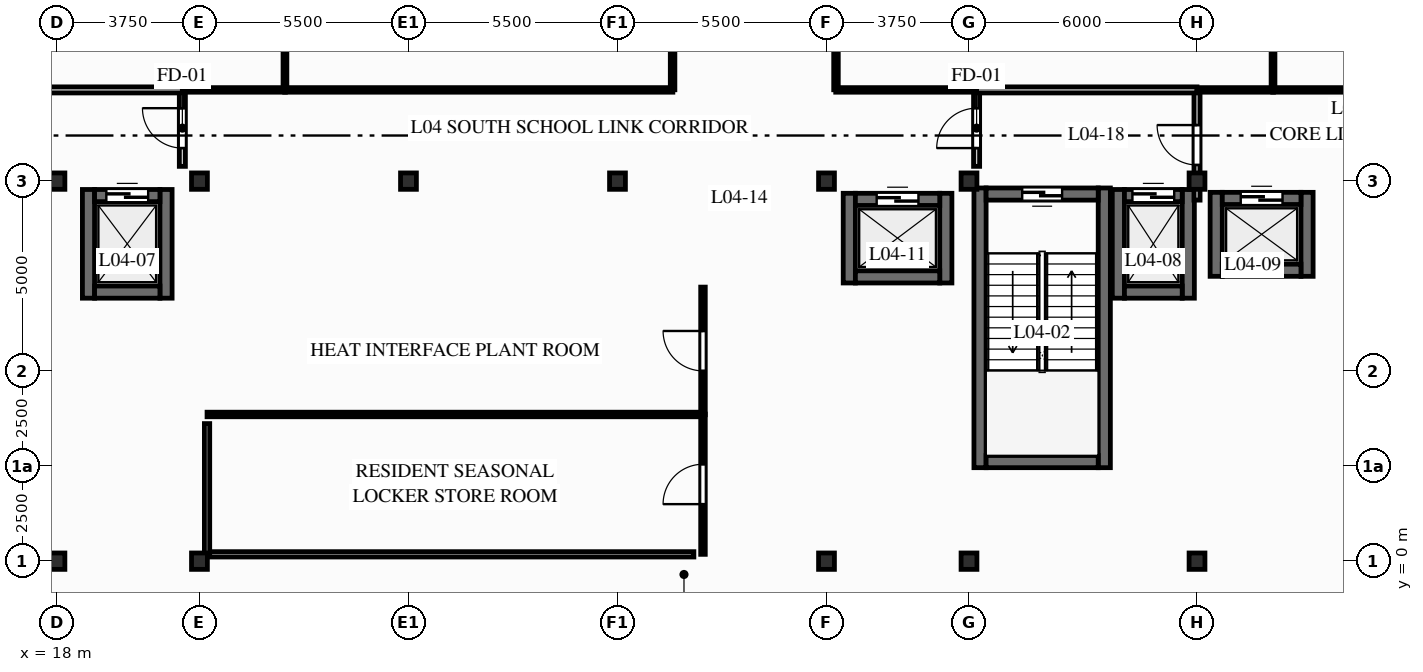
"""IFC4 building model, lengths in metres.
Left out: names, types, materials, properties, quantities, classifications, styles, units other than length and angle.
Written with IfcOpenShell. Run it as: python <this file> out.ifc"""

import sys

from ifc_helpers import new_model, si_unit, direction, frame, frame_2d, origin, origin_2d, place, context, subcontext, project, spatial, rectangle, i_section, extrude, element, fill, save


model = new_model("IFC4")
c1 = context("Model", 3, precision=1e-05, world=origin(), true_north=direction((0.0, 1.0)))
c2 = subcontext(c1, "Body", "Model", "MODEL_VIEW")
j1 = project(units=[si_unit("LENGTHUNIT", "METRE"), si_unit("PLANEANGLEUNIT", "RADIAN")], contexts=[c1])
p1 = place(None, origin())
s1 = spatial("IfcSite", under=j1, at=p1, CompositionType="ELEMENT")
p2 = place(p1, origin())
s2 = spatial("IfcBuilding", under=s1, at=p2, CompositionType="ELEMENT")
p3 = place(p2, frame((0.0, 0.0, 18.0)))
s3 = spatial("IfcBuildingStorey", under=s2, at=p3, CompositionType="ELEMENT", Elevation=18.0)
for number, where, z_axis, x_axis in (
    (1, (18.0, 0.0, 0.0), (0.0, 0.0, 1.0), (1.0, 0.0, 0.0)),
    (2, (18.0, 10.0, 0.0), (0.0, 0.0, 1.0), (1.0, 0.0, 0.0)),
    (3, (21.75, 0.0, 0.0), (0.0, 0.0, 1.0), (1.0, 0.0, 0.0)),
    (4, (21.75, 10.0, 0.0), (0.0, 0.0, 1.0), (1.0, 0.0, 0.0)),
    (5, (27.25, 10.0, 0.0), (0.0, 0.0, 1.0), (1.0, 0.0, 0.0)),
    (6, (32.75, 10.0, 0.0), (0.0, 0.0, 1.0), (1.0, 0.0, 0.0)),
    (7, (38.25, 0.0, 0.0), (0.0, 0.0, 1.0), (1.0, 0.0, 0.0)),
    (8, (38.25, 10.0, 0.0), (0.0, 0.0, 1.0), (1.0, 0.0, 0.0)),
    (9, (42.0, 0.0, 0.0), (0.0, 0.0, 1.0), (1.0, 0.0, 0.0)),
    (10, (42.0, 10.0, 0.0), (0.0, 0.0, 1.0), (1.0, 0.0, 0.0)),
    (11, (48.0, 0.0, 0.0), (0.0, 0.0, 1.0), (1.0, 0.0, 0.0)),
    (12, (48.0, 10.0, 0.0), (0.0, 0.0, 1.0), (1.0, 0.0, 0.0)),
):
    element("IfcColumn", number, at=place(p3, frame(where, z_axis=z_axis, x_axis=x_axis)), inside=s3, PredefinedType="COLUMN", context=c2, shape_type="SweptSolid", body=[
        extrude(i_section(OverallWidth=0.417, OverallDepth=0.431, WebThickness=0.065, FlangeThickness=0.106, FilletRadius=0.015, at=origin_2d()), origin(), (0.0, 0.0, 1.0), 4.5),
    ])
for number, where, z_axis, x_axis in (
    (13, (42.29, 2.46, 0.0), (0.0, 0.0, 1.0), (0.0, 1.0, 0.0)),
    (14, (45.56, 2.46, 0.0), (0.0, 0.0, 1.0), (0.0, 1.0, 0.0)),
):
    element("IfcWall", number, at=place(p3, frame(where, z_axis=z_axis, x_axis=x_axis)), inside=s3, PredefinedType="SHEAR", context=c2, shape_type="SweptSolid", body=[
        extrude(rectangle(XDim=7.36, YDim=0.32, at=frame_2d((3.68, 0.0))), origin(), (0.0, 0.0, 1.0), 4.22),
    ])
p4 = place(p3, frame((42.45, 2.62, 0.0), z_axis=(0.0, 0.0, 1.0), x_axis=(1.0, 0.0, 0.0)))
e15 = element("IfcWall", 15, at=p4, inside=s3, PredefinedType="SHEAR", context=c2, shape_type="SweptSolid", body=[
    extrude(rectangle(XDim=2.95, YDim=0.32, at=frame_2d((1.475, 0.0))), origin(), (0.0, 0.0, 1.0), 4.22),
])
p5 = place(p3, frame((45.4, 9.66, 0.0), z_axis=(0.0, 0.0, 1.0), x_axis=(-1.0, 0.0, 0.0)))
e16 = element("IfcWall", 16, at=p5, inside=s3, PredefinedType="SHEAR", context=c2, shape_type="SweptSolid", body=[
    extrude(rectangle(XDim=2.95, YDim=0.32, at=frame_2d((1.475, 0.0))), origin(), (0.0, 0.0, 1.0), 4.22),
])
p6 = place(p5, frame((0.95, 0.0, 0.0)))
e17 = element("IfcOpeningElement", 17, at=p6, cuts=e16, PredefinedType="OPENING", context=c2, shape_type="SweptSolid", body=[
    extrude(rectangle(XDim=1.05, YDim=2.06, at=frame_2d((0.525, 1.03))), frame((0.0, 0.17, 0.0), z_axis=(0.0, -1.0, 0.0), x_axis=(1.0, 0.0, 0.0)), (0.0, 0.0, 1.0), 0.34),
])
for number, where, z_axis, x_axis in (
    (18, (18.83, 6.92, 0.0), (0.0, 0.0, 1.0), (0.0, 1.0, 0.0)),
    (19, (20.87, 6.92, 0.0), (0.0, 0.0, 1.0), (0.0, 1.0, 0.0)),
):
    element("IfcWall", number, at=place(p3, frame(where, z_axis=z_axis, x_axis=x_axis)), inside=s3, PredefinedType="SHEAR", context=c2, shape_type="SweptSolid", body=[
        extrude(rectangle(XDim=2.86, YDim=0.32, at=frame_2d((1.43, 0.0))), origin(), (0.0, 0.0, 1.0), 4.22),
    ])
p7 = place(p3, frame((18.99, 7.08, 0.0), z_axis=(0.0, 0.0, 1.0), x_axis=(1.0, 0.0, 0.0)))
e20 = element("IfcWall", 20, at=p7, inside=s3, PredefinedType="SHEAR", context=c2, shape_type="SweptSolid", body=[
    extrude(rectangle(XDim=1.72, YDim=0.32, at=frame_2d((0.86, 0.0))), origin(), (0.0, 0.0, 1.0), 4.22),
])
p8 = place(p3, frame((18.99, 9.62, 0.0), z_axis=(0.0, 0.0, 1.0), x_axis=(1.0, 0.0, 0.0)))
e21 = element("IfcWall", 21, at=p8, inside=s3, PredefinedType="SHEAR", context=c2, shape_type="SweptSolid", body=[
    extrude(rectangle(XDim=1.72, YDim=0.32, at=frame_2d((0.86, 0.0))), origin(), (0.0, 0.0, 1.0), 4.22),
])
p9 = place(p8, frame((0.31, 0.0, 0.0)))
e22 = element("IfcOpeningElement", 22, at=p9, cuts=e21, PredefinedType="OPENING", context=c2, shape_type="SweptSolid", body=[
    extrude(rectangle(XDim=1.1, YDim=2.06, at=frame_2d((0.55, 1.03))), frame((0.0, 0.17, 0.0), z_axis=(0.0, -1.0, 0.0), x_axis=(1.0, 0.0, 0.0)), (0.0, 0.0, 1.0), 0.34),
])
for number, where, z_axis, x_axis in (
    (23, (45.93, 6.92, 0.0), (0.0, 0.0, 1.0), (0.0, 1.0, 0.0)),
    (24, (47.77, 6.92, 0.0), (0.0, 0.0, 1.0), (0.0, 1.0, 0.0)),
):
    element("IfcWall", number, at=place(p3, frame(where, z_axis=z_axis, x_axis=x_axis)), inside=s3, PredefinedType="SHEAR", context=c2, shape_type="SweptSolid", body=[
        extrude(rectangle(XDim=2.86, YDim=0.32, at=frame_2d((1.43, 0.0))), origin(), (0.0, 0.0, 1.0), 4.22),
    ])
p10 = place(p3, frame((46.09, 7.08, 0.0), z_axis=(0.0, 0.0, 1.0), x_axis=(1.0, 0.0, 0.0)))
e25 = element("IfcWall", 25, at=p10, inside=s3, PredefinedType="SHEAR", context=c2, shape_type="SweptSolid", body=[
    extrude(rectangle(XDim=1.52, YDim=0.32, at=frame_2d((0.76, 0.0))), origin(), (0.0, 0.0, 1.0), 4.22),
])
p11 = place(p3, frame((46.09, 9.62, 0.0), z_axis=(0.0, 0.0, 1.0), x_axis=(1.0, 0.0, 0.0)))
e26 = element("IfcWall", 26, at=p11, inside=s3, PredefinedType="SHEAR", context=c2, shape_type="SweptSolid", body=[
    extrude(rectangle(XDim=1.52, YDim=0.32, at=frame_2d((0.76, 0.0))), origin(), (0.0, 0.0, 1.0), 4.22),
])
p12 = place(p11, frame((0.21, 0.0, 0.0)))
e27 = element("IfcOpeningElement", 27, at=p12, cuts=e26, PredefinedType="OPENING", context=c2, shape_type="SweptSolid", body=[
    extrude(rectangle(XDim=1.1, YDim=2.06, at=frame_2d((0.55, 1.03))), frame((0.0, 0.17, 0.0), z_axis=(0.0, -1.0, 0.0), x_axis=(1.0, 0.0, 0.0)), (0.0, 0.0, 1.0), 0.34),
])
for number, where, z_axis, x_axis in (
    (28, (48.505, 7.495, 0.0), (0.0, 0.0, 1.0), (0.0, 1.0, 0.0)),
    (29, (50.895, 7.495, 0.0), (0.0, 0.0, 1.0), (0.0, 1.0, 0.0)),
):
    element("IfcWall", number, at=place(p3, frame(where, z_axis=z_axis, x_axis=x_axis)), inside=s3, PredefinedType="SHEAR", context=c2, shape_type="SweptSolid", body=[
        extrude(rectangle(XDim=2.21, YDim=0.32, at=frame_2d((1.105, 0.0))), origin(), (0.0, 0.0, 1.0), 4.22),
    ])
p13 = place(p3, frame((48.665, 7.655, 0.0), z_axis=(0.0, 0.0, 1.0), x_axis=(1.0, 0.0, 0.0)))
e30 = element("IfcWall", 30, at=p13, inside=s3, PredefinedType="SHEAR", context=c2, shape_type="SweptSolid", body=[
    extrude(rectangle(XDim=2.07, YDim=0.32, at=frame_2d((1.035, 0.0))), origin(), (0.0, 0.0, 1.0), 4.22),
])
p14 = place(p3, frame((48.665, 9.545, 0.0), z_axis=(0.0, 0.0, 1.0), x_axis=(1.0, 0.0, 0.0)))
e31 = element("IfcWall", 31, at=p14, inside=s3, PredefinedType="SHEAR", context=c2, shape_type="SweptSolid", body=[
    extrude(rectangle(XDim=2.07, YDim=0.32, at=frame_2d((1.035, 0.0))), origin(), (0.0, 0.0, 1.0), 4.22),
])
p15 = place(p14, frame((0.485, 0.0, 0.0)))
e32 = element("IfcOpeningElement", 32, at=p15, cuts=e31, PredefinedType="OPENING", context=c2, shape_type="SweptSolid", body=[
    extrude(rectangle(XDim=1.1, YDim=2.06, at=frame_2d((0.55, 1.03))), frame((0.0, 0.17, 0.0), z_axis=(0.0, -1.0, 0.0), x_axis=(1.0, 0.0, 0.0)), (0.0, 0.0, 1.0), 0.34),
])
for number, where, z_axis, x_axis in (
    (33, (38.85, 7.32, 0.0), (0.0, 0.0, 1.0), (0.0, 1.0, 0.0)),
    (34, (41.39, 7.32, 0.0), (0.0, 0.0, 1.0), (0.0, 1.0, 0.0)),
):
    element("IfcWall", number, at=place(p3, frame(where, z_axis=z_axis, x_axis=x_axis)), inside=s3, PredefinedType="SHEAR", context=c2, shape_type="SweptSolid", body=[
        extrude(rectangle(XDim=2.36, YDim=0.32, at=frame_2d((1.18, 0.0))), origin(), (0.0, 0.0, 1.0), 4.22),
    ])
p16 = place(p3, frame((39.01, 7.48, 0.0), z_axis=(0.0, 0.0, 1.0), x_axis=(1.0, 0.0, 0.0)))
e35 = element("IfcWall", 35, at=p16, inside=s3, PredefinedType="SHEAR", context=c2, shape_type="SweptSolid", body=[
    extrude(rectangle(XDim=2.22, YDim=0.32, at=frame_2d((1.11, 0.0))), origin(), (0.0, 0.0, 1.0), 4.22),
])
p17 = place(p3, frame((39.01, 9.52, 0.0), z_axis=(0.0, 0.0, 1.0), x_axis=(1.0, 0.0, 0.0)))
e36 = element("IfcWall", 36, at=p17, inside=s3, PredefinedType="SHEAR", context=c2, shape_type="SweptSolid", body=[
    extrude(rectangle(XDim=2.22, YDim=0.32, at=frame_2d((1.11, 0.0))), origin(), (0.0, 0.0, 1.0), 4.22),
])
p18 = place(p17, frame((0.56, 0.0, 0.0)))
e37 = element("IfcOpeningElement", 37, at=p18, cuts=e36, PredefinedType="OPENING", context=c2, shape_type="SweptSolid", body=[
    extrude(rectangle(XDim=1.1, YDim=2.06, at=frame_2d((0.55, 1.03))), frame((0.0, 0.17, 0.0), z_axis=(0.0, -1.0, 0.0), x_axis=(1.0, 0.0, 0.0)), (0.0, 0.0, 1.0), 0.34),
])
p19 = place(p3, frame((35.0, 0.18, 0.0), z_axis=(0.0, 0.0, 1.0), x_axis=(0.0, 1.0, 0.0)))
e38 = element("IfcWall", 38, at=p19, inside=s3, PredefinedType="PARTITIONING", context=c2, shape_type="SweptSolid", body=[
    extrude(rectangle(XDim=3.691, YDim=0.12, at=frame_2d((1.846, 0.0))), origin(), (0.0, 0.0, 1.0), 4.22),
])
p20 = place(p19, frame((1.321, 0.0, 0.0)))
e39 = element("IfcOpeningElement", 39, at=p20, cuts=e38, PredefinedType="OPENING", context=c2, shape_type="SweptSolid", body=[
    extrude(rectangle(XDim=1.05, YDim=2.06, at=frame_2d((0.525, 1.03))), frame((0.0, 0.07, 0.0), z_axis=(0.0, -1.0, 0.0), x_axis=(1.0, 0.0, 0.0)), (0.0, 0.0, 1.0), 0.14),
])
p21 = place(p3, frame((35.0, 3.853, 0.0), z_axis=(0.0, 0.0, 1.0), x_axis=(0.0, 1.0, 0.0)))
e40 = element("IfcWall", 40, at=p21, inside=s3, PredefinedType="PARTITIONING", context=c2, shape_type="SweptSolid", body=[
    extrude(rectangle(XDim=3.358, YDim=0.12, at=frame_2d((1.679, 0.0))), origin(), (0.0, 0.0, 1.0), 3.738),
])
p22 = place(p21, frame((1.154, 0.0, 0.0)))
e41 = element("IfcOpeningElement", 41, at=p22, cuts=e40, PredefinedType="OPENING", context=c2, shape_type="SweptSolid", body=[
    extrude(rectangle(XDim=1.05, YDim=2.06, at=frame_2d((0.525, 1.03))), frame((0.0, 0.07, 0.0), z_axis=(0.0, -1.0, 0.0), x_axis=(1.0, 0.0, 0.0)), (0.0, 0.0, 1.0), 0.14),
])
p23 = place(p3, frame((21.95, 3.86, 0.0), z_axis=(0.0, 0.0, 1.0), x_axis=(1.0, 0.0, 0.0)))
e42 = element("IfcWall", 42, at=p23, inside=s3, PredefinedType="PARTITIONING", context=c2, shape_type="SweptSolid", body=[
    extrude(rectangle(XDim=13.046, YDim=0.12, at=frame_2d((6.523, 0.0))), origin(), (0.0, 0.0, 1.0), 4.22),
])
p24 = place(p3, frame((21.3, 10.389, 0.0), z_axis=(0.0, 0.0, 1.0), x_axis=(0.0, 1.0, 0.0)))
e43 = element("IfcWall", 43, at=p24, inside=s3, PredefinedType="PARTITIONING", context=c2, shape_type="SweptSolid", body=[
    extrude(rectangle(XDim=2.011, YDim=0.16, at=frame_2d((1.006, 0.0))), origin(), (0.0, 0.0, 1.0), 4.22),
])
p25 = place(p24, frame((0.481, 0.0, 0.0)))
e44 = element("IfcOpeningElement", 44, at=p25, cuts=e43, PredefinedType="OPENING", context=c2, shape_type="SweptSolid", body=[
    extrude(rectangle(XDim=1.05, YDim=2.06, at=frame_2d((0.525, 1.03))), frame((0.0, 0.09, 0.0), z_axis=(0.0, -1.0, 0.0), x_axis=(1.0, 0.0, 0.0)), (0.0, 0.0, 1.0), 0.18),
])
p26 = place(p3, frame((12.3, 12.4, 0.0), z_axis=(0.0, 0.0, 1.0), x_axis=(1.0, 0.0, 0.0)))
e45 = element("IfcWall", 45, at=p26, inside=s3, PredefinedType="PARTITIONING", context=c2, shape_type="SweptSolid", body=[
    extrude(rectangle(XDim=9.0, YDim=0.16, at=frame_2d((4.5, 0.0))), origin(), (0.0, 0.0, 1.0), 3.344),
])
p27 = place(p3, frame((42.2, 10.389, 0.0), z_axis=(0.0, 0.0, 1.0), x_axis=(0.0, 1.0, 0.0)))
e46 = element("IfcWall", 46, at=p27, inside=s3, PredefinedType="PARTITIONING", context=c2, shape_type="SweptSolid", body=[
    extrude(rectangle(XDim=2.011, YDim=0.16, at=frame_2d((1.006, 0.0))), origin(), (0.0, 0.0, 1.0), 3.344),
])
p28 = place(p27, frame((0.481, 0.0, 0.0)))
e47 = element("IfcOpeningElement", 47, at=p28, cuts=e46, PredefinedType="OPENING", context=c2, shape_type="SweptSolid", body=[
    extrude(rectangle(XDim=1.05, YDim=2.06, at=frame_2d((0.525, 1.03))), frame((0.0, 0.09, 0.0), z_axis=(0.0, -1.0, 0.0), x_axis=(1.0, 0.0, 0.0)), (0.0, 0.0, 1.0), 0.18),
])
p29 = place(p3, frame((48.0, 9.5, 0.0), z_axis=(0.0, 0.0, 1.0), x_axis=(0.0, 1.0, 0.0)))
e48 = element("IfcWall", 48, at=p29, inside=s3, PredefinedType="PARTITIONING", context=c2, shape_type="SweptSolid", body=[
    extrude(rectangle(XDim=2.9, YDim=0.16, at=frame_2d((1.45, 0.0))), origin(), (0.0, 0.0, 1.0), 3.344),
])
p30 = place(p29, frame((0.925, 0.0, 0.0)))
e49 = element("IfcOpeningElement", 49, at=p30, cuts=e48, PredefinedType="OPENING", context=c2, shape_type="SweptSolid", body=[
    extrude(rectangle(XDim=1.05, YDim=2.06, at=frame_2d((0.525, 1.03))), frame((0.0, 0.09, 0.0), z_axis=(0.0, -1.0, 0.0), x_axis=(1.0, 0.0, 0.0)), (0.0, 0.0, 1.0), 0.18),
])
p31 = place(p3, frame((42.2, 12.4, 0.0), z_axis=(0.0, 0.0, 1.0), x_axis=(1.0, 0.0, 0.0)))
e50 = element("IfcWall", 50, at=p31, inside=s3, PredefinedType="PARTITIONING", context=c2, shape_type="SweptSolid", body=[
    extrude(rectangle(XDim=5.8, YDim=0.16, at=frame_2d((2.9, 0.0))), origin(), (0.0, 0.0, 1.0), 3.344),
])
p32 = place(p3, frame((21.304, 12.4, 0.0), z_axis=(0.0, 0.0, 1.0), x_axis=(1.0, 0.0, 0.0)))
e51 = element("IfcWall", 51, at=p32, inside=s3, PredefinedType="PARTITIONING", context=c2, shape_type="SweptSolid", body=[
    extrude(rectangle(XDim=2.707, YDim=0.12, at=frame_2d((1.354, 0.0))), origin(), (0.0, 0.0, 1.0), 3.344),
])
p33 = place(p3, frame((23.993, 12.4, 0.0), z_axis=(0.0, 0.0, 1.0), x_axis=(1.0, 0.0, 0.0)))
e52 = element("IfcWall", 52, at=p33, inside=s3, PredefinedType="PARTITIONING", context=c2, shape_type="SweptSolid", body=[
    extrude(rectangle(XDim=10.215, YDim=0.12, at=frame_2d((5.107, 0.0))), origin(), (0.0, 0.0, 1.0), 3.344),
])
p34 = place(p3, frame((38.493, 12.4, 0.0), z_axis=(0.0, 0.0, 1.0), x_axis=(1.0, 0.0, 0.0)))
e53 = element("IfcWall", 53, at=p34, inside=s3, PredefinedType="PARTITIONING", context=c2, shape_type="SweptSolid", body=[
    extrude(rectangle(XDim=3.703, YDim=0.12, at=frame_2d((1.852, 0.0))), origin(), (0.0, 0.0, 1.0), 3.344),
])
p35 = place(p3, frame((48.004, 12.4, 0.0), z_axis=(0.0, 0.0, 1.0), x_axis=(1.0, 0.0, 0.0)))
e54 = element("IfcWall", 54, at=p35, inside=s3, PredefinedType="PARTITIONING", context=c2, shape_type="SweptSolid", body=[
    extrude(rectangle(XDim=2.007, YDim=0.12, at=frame_2d((1.004, 0.0))), origin(), (0.0, 0.0, 1.0), 3.344),
])
p36 = place(p3, frame((49.993, 12.4, 0.0), z_axis=(0.0, 0.0, 1.0), x_axis=(1.0, 0.0, 0.0)))
e55 = element("IfcWall", 55, at=p36, inside=s3, PredefinedType="PARTITIONING", context=c2, shape_type="SweptSolid", body=[
    extrude(rectangle(XDim=7.257, YDim=0.12, at=frame_2d((3.629, 0.0))), origin(), (0.0, 0.0, 1.0), 3.344),
])
p37 = place(p3, frame((34.2, 12.404, 0.0), z_axis=(0.0, 0.0, 1.0), x_axis=(0.0, 1.0, 0.0)))
e56 = element("IfcWall", 56, at=p37, inside=s3, PredefinedType="PARTITIONING", context=c2, shape_type="SweptSolid", body=[
    extrude(rectangle(XDim=18.942, YDim=0.12, at=frame_2d((9.471, 0.0))), origin(), (0.0, 0.0, 1.0), 3.583),
])
p38 = place(p3, frame((38.5, 12.404, 0.0), z_axis=(0.0, 0.0, 1.0), x_axis=(0.0, 1.0, 0.0)))
e57 = element("IfcWall", 57, at=p38, inside=s3, PredefinedType="PARTITIONING", context=c2, shape_type="SweptSolid", body=[
    extrude(rectangle(XDim=18.942, YDim=0.12, at=frame_2d((9.471, 0.0))), origin(), (0.0, 0.0, 1.0), 3.344),
])
for number, where, z_axis, x_axis in (
    (58, (24.0, 12.404, 0.0), (0.0, 0.0, 1.0), (0.0, 1.0, 0.0)),
    (59, (50.0, 12.404, 0.0), (0.0, 0.0, 1.0), (0.0, 1.0, 0.0)),
):
    element("IfcWall", number, at=place(p3, frame(where, z_axis=z_axis, x_axis=x_axis)), inside=s3, PredefinedType="PARTITIONING", context=c2, shape_type="SweptSolid", body=[
        extrude(rectangle(XDim=18.942, YDim=0.1, at=frame_2d((9.471, 0.0))), origin(), (0.0, 0.0, 1.0), 3.583),
    ])
p39 = place(p3, frame((21.95, 0.18, 0.0), z_axis=(0.0, 0.0, 1.0), x_axis=(1.0, 0.0, 0.0)))
e60 = element("IfcWall", 60, at=p39, inside=s3, PredefinedType="PARTITIONING", context=c2, shape_type="SweptSolid", body=[
    extrude(rectangle(XDim=12.81, YDim=0.14, at=frame_2d((6.405, 0.0))), origin(), (0.0, 0.0, 1.0), 3.583),
])
p40 = place(p3, frame((21.95, 0.18, 0.0), z_axis=(0.0, 0.0, 1.0), x_axis=(0.0, 1.0, 0.0)))
e61 = element("IfcWall", 61, at=p40, inside=s3, PredefinedType="PARTITIONING", context=c2, shape_type="SweptSolid", body=[
    extrude(rectangle(XDim=3.44, YDim=0.14, at=frame_2d((1.72, 0.0))), origin(), (0.0, 0.0, 1.0), 3.344),
])
p41 = place(p6, origin())
e62 = element("IfcDoor", 62, at=p41, inside=s3, OperationType="SINGLE_SWING_LEFT", PredefinedType="DOOR", context=c2, shape_type="SweptSolid", body=[
    extrude(rectangle(XDim=1.05, YDim=2.06, at=frame_2d((0.525, 1.03))), frame((0.0, 0.025, 0.0), z_axis=(0.0, -1.0, 0.0), x_axis=(1.0, 0.0, 0.0)), (0.0, 0.0, 1.0), 0.05),
])
fill(e17, e62)
p42 = place(p9, origin())
e63 = element("IfcDoor", 63, at=p42, inside=s3, OperationType="SLIDING_TO_RIGHT", PredefinedType="DOOR", context=c2, shape_type="SweptSolid", body=[
    extrude(rectangle(XDim=1.1, YDim=2.06, at=frame_2d((0.55, 1.03))), frame((0.0, 0.025, 0.0), z_axis=(0.0, -1.0, 0.0), x_axis=(1.0, 0.0, 0.0)), (0.0, 0.0, 1.0), 0.05),
])
fill(e22, e63)
p43 = place(p12, origin())
e64 = element("IfcDoor", 64, at=p43, inside=s3, OperationType="SLIDING_TO_LEFT", PredefinedType="DOOR", context=c2, shape_type="SweptSolid", body=[
    extrude(rectangle(XDim=1.1, YDim=2.06, at=frame_2d((0.55, 1.03))), frame((0.0, 0.025, 0.0), z_axis=(0.0, -1.0, 0.0), x_axis=(1.0, 0.0, 0.0)), (0.0, 0.0, 1.0), 0.05),
])
fill(e27, e64)
p44 = place(p15, origin())
e65 = element("IfcDoor", 65, at=p44, inside=s3, OperationType="SLIDING_TO_RIGHT", PredefinedType="DOOR", context=c2, shape_type="SweptSolid", body=[
    extrude(rectangle(XDim=1.1, YDim=2.06, at=frame_2d((0.55, 1.03))), frame((0.0, 0.025, 0.0), z_axis=(0.0, -1.0, 0.0), x_axis=(1.0, 0.0, 0.0)), (0.0, 0.0, 1.0), 0.05),
])
fill(e32, e65)
p45 = place(p18, origin())
e66 = element("IfcDoor", 66, at=p45, inside=s3, OperationType="SLIDING_TO_RIGHT", PredefinedType="DOOR", context=c2, shape_type="SweptSolid", body=[
    extrude(rectangle(XDim=1.1, YDim=2.06, at=frame_2d((0.55, 1.03))), frame((0.0, 0.025, 0.0), z_axis=(0.0, -1.0, 0.0), x_axis=(1.0, 0.0, 0.0)), (0.0, 0.0, 1.0), 0.05),
])
fill(e37, e66)
p46 = place(p20, origin())
e67 = element("IfcDoor", 67, at=p46, inside=s3, OperationType="SINGLE_SWING_LEFT", PredefinedType="DOOR", context=c2, shape_type="SweptSolid", body=[
    extrude(rectangle(XDim=1.05, YDim=2.06, at=frame_2d((0.525, 1.03))), frame((0.0, 0.025, 0.0), z_axis=(0.0, -1.0, 0.0), x_axis=(1.0, 0.0, 0.0)), (0.0, 0.0, 1.0), 0.05),
])
fill(e39, e67)
p47 = place(p22, origin())
e68 = element("IfcDoor", 68, at=p47, inside=s3, OperationType="SINGLE_SWING_RIGHT", PredefinedType="DOOR", context=c2, shape_type="SweptSolid", body=[
    extrude(rectangle(XDim=1.05, YDim=2.06, at=frame_2d((0.525, 1.03))), frame((0.0, 0.025, 0.0), z_axis=(0.0, -1.0, 0.0), x_axis=(1.0, 0.0, 0.0)), (0.0, 0.0, 1.0), 0.05),
])
fill(e41, e68)
p48 = place(p25, origin())
e69 = element("IfcDoor", 69, at=p48, inside=s3, OperationType="SINGLE_SWING_RIGHT", PredefinedType="DOOR", context=c2, shape_type="SweptSolid", body=[
    extrude(rectangle(XDim=1.05, YDim=2.06, at=frame_2d((0.525, 1.03))), frame((0.0, 0.025, 0.0), z_axis=(0.0, -1.0, 0.0), x_axis=(1.0, 0.0, 0.0)), (0.0, 0.0, 1.0), 0.05),
])
fill(e44, e69)
p49 = place(p28, origin())
e70 = element("IfcDoor", 70, at=p49, inside=s3, OperationType="SINGLE_SWING_LEFT", PredefinedType="DOOR", context=c2, shape_type="SweptSolid", body=[
    extrude(rectangle(XDim=1.05, YDim=2.06, at=frame_2d((0.525, 1.03))), frame((0.0, 0.025, 0.0), z_axis=(0.0, -1.0, 0.0), x_axis=(1.0, 0.0, 0.0)), (0.0, 0.0, 1.0), 0.05),
])
fill(e47, e70)
p50 = place(p30, origin())
e71 = element("IfcDoor", 71, at=p50, inside=s3, OperationType="SINGLE_SWING_RIGHT", PredefinedType="DOOR", context=c2, shape_type="SweptSolid", body=[
    extrude(rectangle(XDim=1.05, YDim=2.06, at=frame_2d((0.525, 1.03))), frame((0.0, 0.025, 0.0), z_axis=(0.0, -1.0, 0.0), x_axis=(1.0, 0.0, 0.0)), (0.0, 0.0, 1.0), 0.05),
])
fill(e49, e71)
save(model, sys.argv[1])
